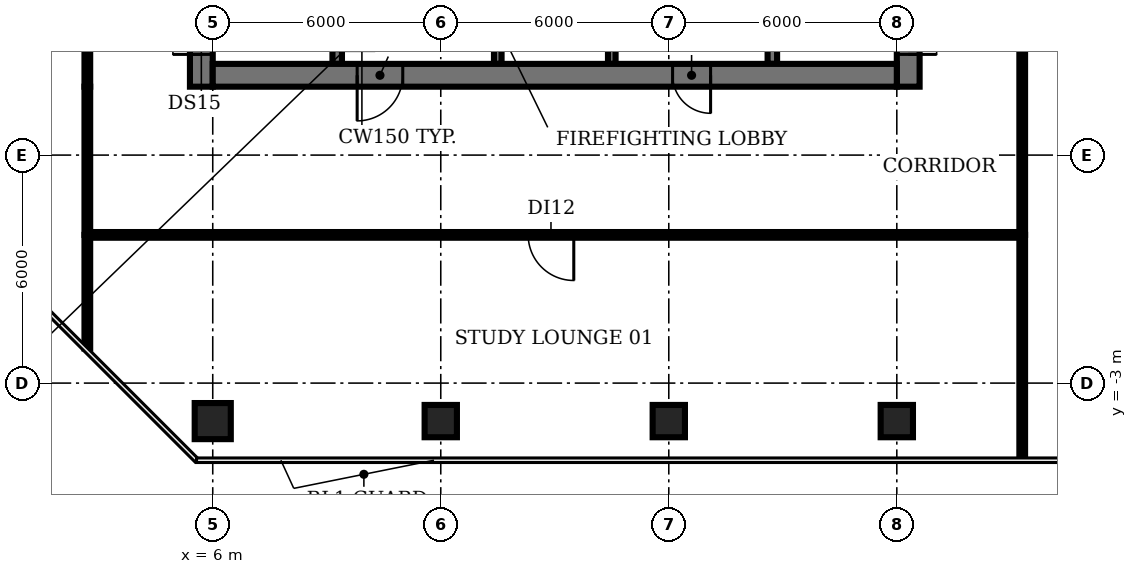
"""IFC4 building model, lengths in metres.
Left out: names, types, materials, properties, quantities, classifications, styles, units other than length and angle.
Written with IfcOpenShell. Run it as: python <this file> out.ifc"""

import sys

from ifc_helpers import new_model, si_unit, direction, frame, frame_2d, origin, origin_2d, place, context, subcontext, project, spatial, rectangle, circle, extrude, element, fill, save


model = new_model("IFC4")
c1 = context("Model", 3, precision=1e-05, world=origin(), true_north=direction((0.0, 1.0)))
c2 = subcontext(c1, "Body", "Model", "MODEL_VIEW")
j1 = project(units=[si_unit("LENGTHUNIT", "METRE"), si_unit("PLANEANGLEUNIT", "RADIAN")], contexts=[c1])
p1 = place(None, origin())
s1 = spatial("IfcSite", under=j1, at=p1, CompositionType="ELEMENT")
p2 = place(p1, origin())
s2 = spatial("IfcBuilding", under=s1, at=p2, CompositionType="ELEMENT")
p3 = place(p2, frame((0.0, 0.0, 188.6)))
s3 = spatial("IfcBuildingStorey", under=s2, at=p3, CompositionType="ELEMENT", Elevation=188.6)
p4 = place(p3, frame((6.0, -4.0, 0.0), z_axis=(0.0, 0.0, 1.0), x_axis=(1.0, 0.0, 0.0)))
e1 = element("IfcColumn", 1, at=p4, inside=s3, PredefinedType="COLUMN", context=c2, shape_type="SweptSolid", body=[
    extrude(circle(Radius=0.475, at=origin_2d()), origin(), (0.0, 0.0, 1.0), 3.85),
])
for number, where, z_axis, x_axis in (
    (2, (12.0, -4.0, 0.0), (0.0, 0.0, 1.0), (1.0, 0.0, 0.0)),
    (3, (18.0, -4.0, 0.0), (0.0, 0.0, 1.0), (1.0, 0.0, 0.0)),
    (4, (24.0, -4.0, 0.0), (0.0, 0.0, 1.0), (1.0, 0.0, 0.0)),
):
    element("IfcColumn", number, at=place(p3, frame(where, z_axis=z_axis, x_axis=x_axis)), inside=s3, PredefinedType="COLUMN", context=c2, shape_type="SweptSolid", body=[
        extrude(rectangle(XDim=0.85, YDim=0.85, at=origin_2d()), origin(), (0.0, 0.0, 1.0), 3.85),
    ])
p5 = place(p3, frame((9.275, 11.825, 0.0), z_axis=(0.0, 0.0, 1.0), x_axis=(0.0, -1.0, 0.0)))
e5 = element("IfcWall", 5, at=p5, inside=s3, PredefinedType="SHEAR", context=c2, shape_type="SweptSolid", body=[
    extrude(rectangle(XDim=6.425, YDim=0.25, at=frame_2d((3.212, 0.0))), origin(), (0.0, 0.0, 1.0), 3.85),
])
p6 = place(p5, frame((5.075, 0.0, 0.0)))
e6 = element("IfcOpeningElement", 6, at=p6, cuts=e5, PredefinedType="OPENING", context=c2, shape_type="SweptSolid", body=[
    extrude(rectangle(XDim=1.0, YDim=2.1, at=frame_2d((0.5, 1.05))), frame((0.0, 0.135, 0.0), z_axis=(0.0, -1.0, 0.0), x_axis=(1.0, 0.0, 0.0)), (0.0, 0.0, 1.0), 0.27),
])
p7 = place(p3, frame((13.5, 5.4, 0.0), z_axis=(0.0, 0.0, 1.0), x_axis=(0.0, 1.0, 0.0)))
e7 = element("IfcWall", 7, at=p7, inside=s3, PredefinedType="SHEAR", context=c2, shape_type="SweptSolid", body=[
    extrude(rectangle(XDim=8.2, YDim=0.2, at=frame_2d((4.1, 0.0))), origin(), (0.0, 0.0, 1.0), 3.85),
])
p8 = place(p7, frame((0.75, 0.0, 0.0)))
e8 = element("IfcOpeningElement", 8, at=p8, cuts=e7, PredefinedType="OPENING", context=c2, shape_type="SweptSolid", body=[
    extrude(rectangle(XDim=1.1, YDim=2.1, at=frame_2d((0.55, 1.05))), frame((0.0, 0.11, 0.0), z_axis=(0.0, -1.0, 0.0), x_axis=(1.0, 0.0, 0.0)), (0.0, 0.0, 1.0), 0.22),
])
p9 = place(p7, frame((3.55, 0.0, 0.0)))
e9 = element("IfcOpeningElement", 9, at=p9, cuts=e7, PredefinedType="OPENING", context=c2, shape_type="SweptSolid", body=[
    extrude(rectangle(XDim=1.1, YDim=2.1, at=frame_2d((0.55, 1.05))), frame((0.0, 0.11, 0.0), z_axis=(0.0, -1.0, 0.0), x_axis=(1.0, 0.0, 0.0)), (0.0, 0.0, 1.0), 0.22),
])
p10 = place(p7, frame((6.35, 0.0, 0.0)))
e10 = element("IfcOpeningElement", 10, at=p10, cuts=e7, PredefinedType="OPENING", context=c2, shape_type="SweptSolid", body=[
    extrude(rectangle(XDim=1.1, YDim=2.1, at=frame_2d((0.55, 1.05))), frame((0.0, 0.11, 0.0), z_axis=(0.0, -1.0, 0.0), x_axis=(1.0, 0.0, 0.0)), (0.0, 0.0, 1.0), 0.22),
])
p11 = place(p3, frame((16.5, 5.4, 0.0), z_axis=(0.0, 0.0, 1.0), x_axis=(0.0, 1.0, 0.0)))
e11 = element("IfcWall", 11, at=p11, inside=s3, PredefinedType="SHEAR", context=c2, shape_type="SweptSolid", body=[
    extrude(rectangle(XDim=8.2, YDim=0.2, at=frame_2d((4.1, 0.0))), origin(), (0.0, 0.0, 1.0), 3.85),
])
p12 = place(p3, frame((20.725, 5.4, 0.0), z_axis=(0.0, 0.0, 1.0), x_axis=(0.0, 1.0, 0.0)))
e12 = element("IfcWall", 12, at=p12, inside=s3, PredefinedType="SHEAR", context=c2, shape_type="SweptSolid", body=[
    extrude(rectangle(XDim=6.3, YDim=0.25, at=frame_2d((3.15, 0.0))), origin(), (0.0, 0.0, 1.0), 3.85),
])
p13 = place(p3, frame((5.7, 4.8, 0.0), z_axis=(0.0, 0.0, 1.0), x_axis=(0.0, 1.0, 0.0)))
e13 = element("IfcWall", 13, at=p13, inside=s3, PredefinedType="SHEAR", context=c2, shape_type="SweptSolid", body=[
    extrude(rectangle(XDim=20.6, YDim=0.6, at=frame_2d((10.3, 0.0))), origin(), (0.0, 0.0, 1.0), 3.85),
])
p14 = place(p13, frame((0.85, 0.0, 0.0)))
e14 = element("IfcOpeningElement", 14, at=p14, cuts=e13, PredefinedType="OPENING", context=c2, shape_type="SweptSolid", body=[
    extrude(rectangle(XDim=1.5, YDim=2.1, at=frame_2d((0.75, 1.05))), frame((0.0, 0.31, 0.0), z_axis=(0.0, -1.0, 0.0), x_axis=(1.0, 0.0, 0.0)), (0.0, 0.0, 1.0), 0.62),
])
p15 = place(p13, frame((7.3, 0.0, 0.0)))
e15 = element("IfcOpeningElement", 15, at=p15, cuts=e13, PredefinedType="OPENING", context=c2, shape_type="SweptSolid", body=[
    extrude(rectangle(XDim=1.2, YDim=2.1, at=frame_2d((0.6, 1.05))), frame((0.0, 0.31, 0.0), z_axis=(0.0, -1.0, 0.0), x_axis=(1.0, 0.0, 0.0)), (0.0, 0.0, 1.0), 0.62),
])
p16 = place(p13, frame((13.85, 0.0, 0.0)))
e16 = element("IfcOpeningElement", 16, at=p16, cuts=e13, PredefinedType="OPENING", context=c2, shape_type="SweptSolid", body=[
    extrude(rectangle(XDim=1.2, YDim=2.1, at=frame_2d((0.6, 1.05))), frame((0.0, 0.31, 0.0), z_axis=(0.0, -1.0, 0.0), x_axis=(1.0, 0.0, 0.0)), (0.0, 0.0, 1.0), 0.62),
])
p17 = place(p3, frame((24.3, 25.555, 0.0), z_axis=(0.0, 0.0, 1.0), x_axis=(0.0, -1.0, 0.0)))
e17 = element("IfcWall", 17, at=p17, inside=s3, PredefinedType="SHEAR", context=c2, shape_type="SweptSolid", body=[
    extrude(rectangle(XDim=20.755, YDim=0.6, at=frame_2d((10.377, 0.0))), origin(), (0.0, 0.0, 1.0), 3.85),
])
p18 = place(p17, frame((18.405, 0.0, 0.0)))
e18 = element("IfcOpeningElement", 18, at=p18, cuts=e17, PredefinedType="OPENING", context=c2, shape_type="SweptSolid", body=[
    extrude(rectangle(XDim=1.5, YDim=2.1, at=frame_2d((0.75, 1.05))), frame((0.0, 0.31, 0.0), z_axis=(0.0, -1.0, 0.0), x_axis=(1.0, 0.0, 0.0)), (0.0, 0.0, 1.0), 0.62),
])
p19 = place(p17, frame((12.305, 0.0, 0.0)))
e19 = element("IfcOpeningElement", 19, at=p19, cuts=e17, PredefinedType="OPENING", context=c2, shape_type="SweptSolid", body=[
    extrude(rectangle(XDim=0.9, YDim=2.1, at=frame_2d((0.45, 1.05))), frame((0.0, 0.31, 0.0), z_axis=(0.0, -1.0, 0.0), x_axis=(1.0, 0.0, 0.0)), (0.0, 0.0, 1.0), 0.62),
])
p20 = place(p17, frame((6.305, 0.0, 0.0)))
e20 = element("IfcOpeningElement", 20, at=p20, cuts=e17, PredefinedType="OPENING", context=c2, shape_type="SweptSolid", body=[
    extrude(rectangle(XDim=2.0, YDim=2.1, at=frame_2d((1.0, 1.05))), frame((0.0, 0.31, 0.0), z_axis=(0.0, -1.0, 0.0), x_axis=(1.0, 0.0, 0.0)), (0.0, 0.0, 1.0), 0.62),
])
p21 = place(p3, frame((24.0, 5.1, 0.0), z_axis=(0.0, 0.0, 1.0), x_axis=(-1.0, 0.0, 0.0)))
e21 = element("IfcWall", 21, at=p21, inside=s3, PredefinedType="SHEAR", context=c2, shape_type="SweptSolid", body=[
    extrude(rectangle(XDim=18.0, YDim=0.6, at=frame_2d((9.0, 0.0))), origin(), (0.0, 0.0, 1.0), 3.85),
])
p22 = place(p21, frame((13.0, 0.0, 0.0)))
e22 = element("IfcOpeningElement", 22, at=p22, cuts=e21, PredefinedType="OPENING", context=c2, shape_type="SweptSolid", body=[
    extrude(rectangle(XDim=1.2, YDim=2.1, at=frame_2d((0.6, 1.05))), frame((0.0, 0.31, 0.0), z_axis=(0.0, -1.0, 0.0), x_axis=(1.0, 0.0, 0.0)), (0.0, 0.0, 1.0), 0.62),
])
p23 = place(p21, frame((4.9, 0.0, 0.0)))
e23 = element("IfcOpeningElement", 23, at=p23, cuts=e21, PredefinedType="OPENING", context=c2, shape_type="SweptSolid", body=[
    extrude(rectangle(XDim=1.0, YDim=2.1, at=frame_2d((0.5, 1.05))), frame((0.0, 0.31, 0.0), z_axis=(0.0, -1.0, 0.0), x_axis=(1.0, 0.0, 0.0)), (0.0, 0.0, 1.0), 0.62),
])
p24 = place(p3, frame((2.7, -2.09, 0.0), z_axis=(0.0, 0.0, 1.0), x_axis=(0.0, 1.0, 0.0)))
e24 = element("IfcWall", 24, at=p24, inside=s3, PredefinedType="PARTITIONING", context=c2, shape_type="SweptSolid", body=[
    extrude(rectangle(XDim=2.99, YDim=0.15, at=frame_2d((1.495, 0.0))), origin(), (0.0, 0.0, 1.0), 2.88),
])
p25 = place(p3, frame((2.7, 0.9, 0.0), z_axis=(0.0, 0.0, 1.0), x_axis=(0.0, 1.0, 0.0)))
e25 = element("IfcWall", 25, at=p25, inside=s3, PredefinedType="PARTITIONING", context=c2, shape_type="SweptSolid", body=[
    extrude(rectangle(XDim=3.9, YDim=0.15, at=frame_2d((1.95, 0.0))), origin(), (0.0, 0.0, 1.0), 2.88),
])
p26 = place(p3, frame((2.7, 4.8, 0.0), z_axis=(0.0, 0.0, 1.0), x_axis=(0.0, 1.0, 0.0)))
e26 = element("IfcWall", 26, at=p26, inside=s3, PredefinedType="PARTITIONING", context=c2, shape_type="SweptSolid", body=[
    extrude(rectangle(XDim=20.6, YDim=0.15, at=frame_2d((10.3, 0.0))), origin(), (0.0, 0.0, 1.0), 2.88),
])
p27 = place(p26, frame((10.2, 0.0, 0.0)))
e27 = element("IfcOpeningElement", 27, at=p27, cuts=e26, PredefinedType="OPENING", context=c2, shape_type="SweptSolid", body=[
    extrude(rectangle(XDim=1.2, YDim=2.1, at=frame_2d((0.6, 1.05))), frame((0.0, 0.085, 0.0), z_axis=(0.0, -1.0, 0.0), x_axis=(1.0, 0.0, 0.0)), (0.0, 0.0, 1.0), 0.17),
])
p28 = place(p3, frame((27.3, -4.98, 0.0), z_axis=(0.0, 0.0, 1.0), x_axis=(0.0, 1.0, 0.0)))
e28 = element("IfcWall", 28, at=p28, inside=s3, PredefinedType="PARTITIONING", context=c2, shape_type="SweptSolid", body=[
    extrude(rectangle(XDim=5.88, YDim=0.15, at=frame_2d((2.94, 0.0))), origin(), (0.0, 0.0, 1.0), 2.88),
])
p29 = place(p3, frame((27.3, 0.9, 0.0), z_axis=(0.0, 0.0, 1.0), x_axis=(-1.0, 0.0, 0.0)))
e29 = element("IfcWall", 29, at=p29, inside=s3, PredefinedType="PARTITIONING", context=c2, shape_type="SweptSolid", body=[
    extrude(rectangle(XDim=24.6, YDim=0.15, at=frame_2d((12.3, 0.0))), origin(), (0.0, 0.0, 1.0), 2.88),
])
p30 = place(p29, frame((11.8, 0.0, 0.0)))
e30 = element("IfcOpeningElement", 30, at=p30, cuts=e29, PredefinedType="OPENING", context=c2, shape_type="SweptSolid", body=[
    extrude(rectangle(XDim=1.2, YDim=2.1, at=frame_2d((0.6, 1.05))), frame((0.0, 0.085, 0.0), z_axis=(0.0, -1.0, 0.0), x_axis=(1.0, 0.0, 0.0)), (0.0, 0.0, 1.0), 0.17),
])
p31 = place(p3, frame((27.3, 0.9, 0.0), z_axis=(0.0, 0.0, 1.0), x_axis=(0.0, 1.0, 0.0)))
e31 = element("IfcWall", 31, at=p31, inside=s3, PredefinedType="PARTITIONING", context=c2, shape_type="SweptSolid", body=[
    extrude(rectangle(XDim=13.9, YDim=0.15, at=frame_2d((6.95, 0.0))), origin(), (0.0, 0.0, 1.0), 2.88),
])
p32 = place(p14, origin())
e32 = element("IfcDoor", 32, at=p32, inside=s3, OperationType="DOUBLE_DOOR_SINGLE_SWING", PredefinedType="DOOR", context=c2, shape_type="SweptSolid", body=[
    extrude(rectangle(XDim=1.5, YDim=2.1, at=frame_2d((0.75, 1.05))), frame((0.0, 0.025, 0.0), z_axis=(0.0, -1.0, 0.0), x_axis=(1.0, 0.0, 0.0)), (0.0, 0.0, 1.0), 0.05),
])
fill(e14, e32)
p33 = place(p18, origin())
e33 = element("IfcDoor", 33, at=p33, inside=s3, OperationType="DOUBLE_DOOR_SINGLE_SWING", PredefinedType="DOOR", context=c2, shape_type="SweptSolid", body=[
    extrude(rectangle(XDim=1.5, YDim=2.1, at=frame_2d((0.75, 1.05))), frame((0.0, 0.025, 0.0), z_axis=(0.0, -1.0, 0.0), x_axis=(1.0, 0.0, 0.0)), (0.0, 0.0, 1.0), 0.05),
])
fill(e18, e33)
p34 = place(p22, origin())
e34 = element("IfcDoor", 34, at=p34, inside=s3, OperationType="SINGLE_SWING_RIGHT", PredefinedType="DOOR", context=c2, shape_type="SweptSolid", body=[
    extrude(rectangle(XDim=1.2, YDim=2.1, at=frame_2d((0.6, 1.05))), frame((0.0, 0.025, 0.0), z_axis=(0.0, -1.0, 0.0), x_axis=(1.0, 0.0, 0.0)), (0.0, 0.0, 1.0), 0.05),
])
fill(e22, e34)
p35 = place(p23, origin())
e35 = element("IfcDoor", 35, at=p35, inside=s3, OperationType="SINGLE_SWING_LEFT", PredefinedType="DOOR", context=c2, shape_type="SweptSolid", body=[
    extrude(rectangle(XDim=1.0, YDim=2.1, at=frame_2d((0.5, 1.05))), frame((0.0, -0.24, 0.0), z_axis=(0.0, -1.0, 0.0), x_axis=(1.0, 0.0, 0.0)), (0.0, 0.0, 1.0), 0.05),
])
fill(e23, e35)
p36 = place(p30, origin())
e36 = element("IfcDoor", 36, at=p36, inside=s3, OperationType="SINGLE_SWING_LEFT", PredefinedType="DOOR", context=c2, shape_type="SweptSolid", body=[
    extrude(rectangle(XDim=1.2, YDim=2.1, at=frame_2d((0.6, 1.05))), frame((0.0, 0.025, 0.0), z_axis=(0.0, -1.0, 0.0), x_axis=(1.0, 0.0, 0.0)), (0.0, 0.0, 1.0), 0.05),
])
fill(e30, e36)
save(model, sys.argv[1])
